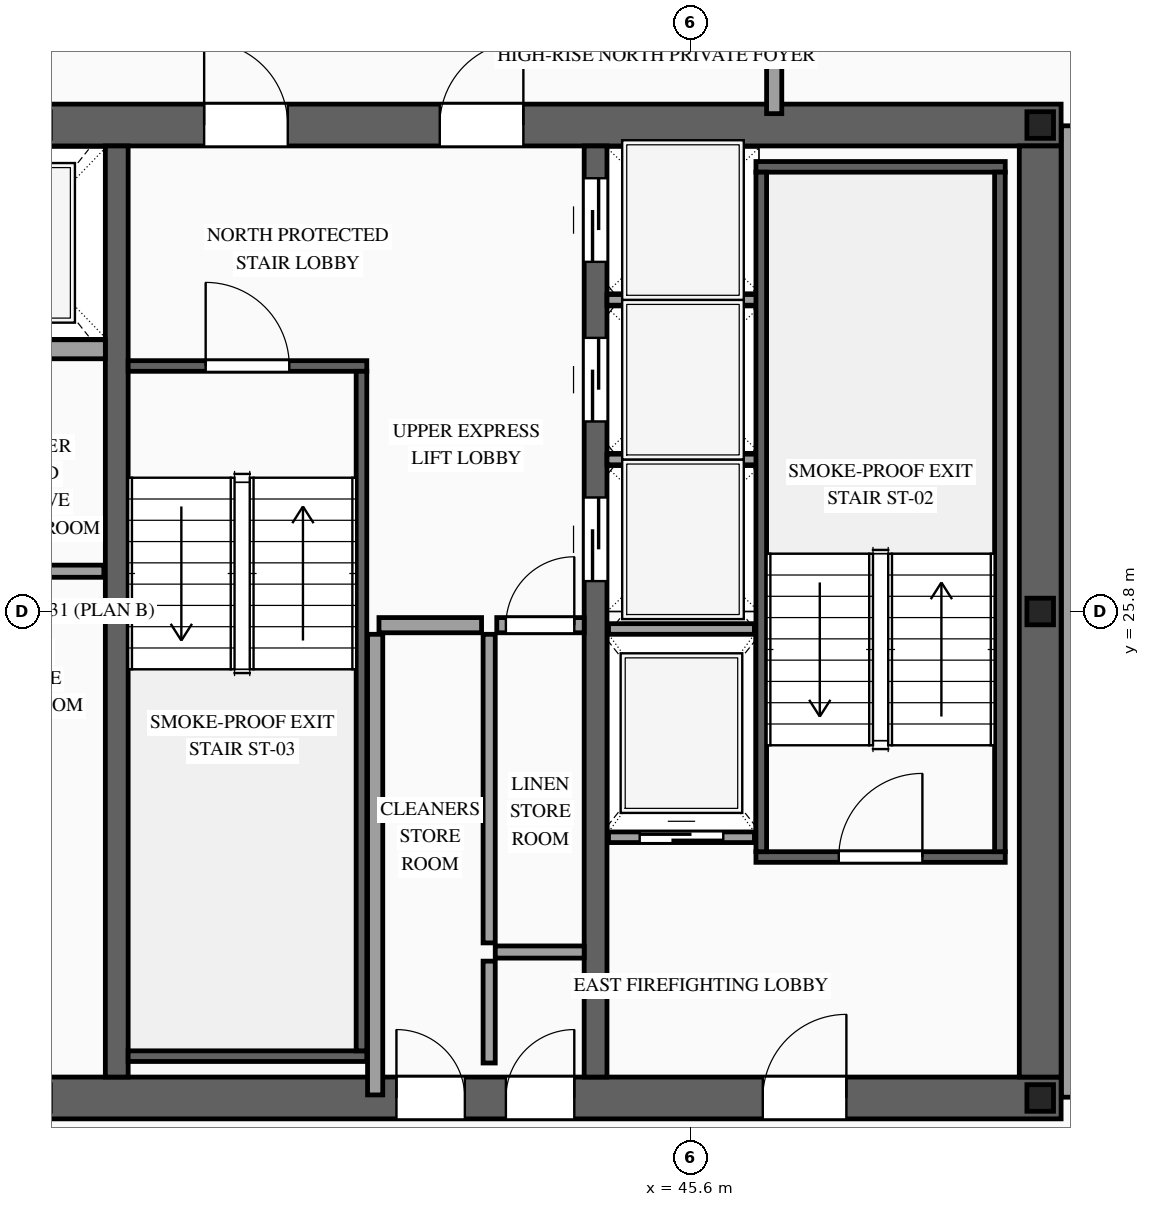
"""IFC4 building model, lengths in metres.
Left out: names, types, materials, properties, quantities, classifications, styles, units other than length and angle.
Written with IfcOpenShell. Run it as: python <this file> out.ifc"""

import sys

from ifc_helpers import new_model, si_unit, direction, frame, frame_2d, origin, origin_2d, place, context, subcontext, project, spatial, rectangle, i_section, extrude, source, transform, mapped, element, fill, save


model = new_model("IFC4")
c1 = context("Model", 3, precision=1e-05, world=origin(), true_north=direction((0.0, 1.0)))
c2 = subcontext(c1, "Body", "Model", "MODEL_VIEW")
j1 = project(units=[si_unit("LENGTHUNIT", "METRE"), si_unit("PLANEANGLEUNIT", "RADIAN")], contexts=[c1])
p1 = place(None, origin())
s1 = spatial("IfcSite", under=j1, at=p1, CompositionType="ELEMENT")
p2 = place(p1, origin())
s2 = spatial("IfcBuilding", under=s1, at=p2, CompositionType="ELEMENT")
p3 = place(p2, frame((0.0, 0.0, 271.6)))
s3 = spatial("IfcBuildingStorey", under=s2, at=p3, CompositionType="ELEMENT", Elevation=271.6)
p4 = place(p3, frame((23.525, 19.4, 0.0), z_axis=(0.0, 0.0, 1.0), x_axis=(1.0, 0.0, 0.0)))
e1 = element("IfcWall", 1, at=p4, inside=s3, PredefinedType="SHEAR", context=c2, shape_type="SweptSolid", body=[
    extrude(rectangle(XDim=26.95, YDim=0.55, at=frame_2d((13.475, 0.0))), origin(), (0.0, 0.0, 1.0), 3.5),
])
p5 = place(p4, frame((1.925, 0.0, 0.0)))
e2 = element("IfcOpeningElement", 2, at=p5, cuts=e1, PredefinedType="OPENING", context=c2, shape_type="SweptSolid", body=[
    extrude(rectangle(XDim=1.1, YDim=2.2, at=frame_2d((0.55, 1.1))), frame((0.0, 0.29, 0.0), z_axis=(0.0, -1.0, 0.0), x_axis=(1.0, 0.0, 0.0)), (0.0, 0.0, 1.0), 0.58),
])
p6 = place(p4, frame((9.825, 0.0, 0.0)))
e3 = element("IfcOpeningElement", 3, at=p6, cuts=e1, PredefinedType="OPENING", context=c2, shape_type="SweptSolid", body=[
    extrude(rectangle(XDim=1.1, YDim=2.2, at=frame_2d((0.55, 1.1))), frame((0.0, 0.29, 0.0), z_axis=(0.0, -1.0, 0.0), x_axis=(1.0, 0.0, 0.0)), (0.0, 0.0, 1.0), 0.58),
])
p7 = place(p4, frame((23.025, 0.0, 0.0)))
e4 = element("IfcOpeningElement", 4, at=p7, cuts=e1, PredefinedType="OPENING", context=c2, shape_type="SweptSolid", body=[
    extrude(rectangle(XDim=1.1, YDim=2.2, at=frame_2d((0.55, 1.1))), frame((0.0, 0.29, 0.0), z_axis=(0.0, -1.0, 0.0), x_axis=(1.0, 0.0, 0.0)), (0.0, 0.0, 1.0), 0.58),
])
p8 = place(p4, frame((19.645, 0.0, 0.0)))
e5 = element("IfcOpeningElement", 5, at=p8, cuts=e1, PredefinedType="OPENING", context=c2, shape_type="SweptSolid", body=[
    extrude(rectangle(XDim=0.9, YDim=2.15, at=frame_2d((0.45, 1.075))), frame((0.0, 0.29, 0.0), z_axis=(0.0, -1.0, 0.0), x_axis=(1.0, 0.0, 0.0)), (0.0, 0.0, 1.0), 0.58),
])
p9 = place(p4, frame((18.205, 0.0, 0.0)))
e6 = element("IfcOpeningElement", 6, at=p9, cuts=e1, PredefinedType="OPENING", context=c2, shape_type="SweptSolid", body=[
    extrude(rectangle(XDim=0.9, YDim=2.15, at=frame_2d((0.45, 1.075))), frame((0.0, 0.29, 0.0), z_axis=(0.0, -1.0, 0.0), x_axis=(1.0, 0.0, 0.0)), (0.0, 0.0, 1.0), 0.58),
])
p10 = place(p3, frame((23.525, 32.2, 0.0), z_axis=(0.0, 0.0, 1.0), x_axis=(1.0, 0.0, 0.0)))
e7 = element("IfcWall", 7, at=p10, inside=s3, PredefinedType="SHEAR", context=c2, shape_type="SweptSolid", body=[
    extrude(rectangle(XDim=26.95, YDim=0.55, at=frame_2d((13.475, 0.0))), origin(), (0.0, 0.0, 1.0), 3.5),
])
p11 = place(p10, frame((4.545, 0.0, 0.0)))
e8 = element("IfcOpeningElement", 8, at=p11, cuts=e7, PredefinedType="OPENING", context=c2, shape_type="SweptSolid", body=[
    extrude(rectangle(XDim=0.9, YDim=2.15, at=frame_2d((0.45, 1.075))), frame((0.0, 0.29, 0.0), z_axis=(0.0, -1.0, 0.0), x_axis=(1.0, 0.0, 0.0)), (0.0, 0.0, 1.0), 0.58),
])
p12 = place(p10, frame((9.825, 0.0, 0.0)))
e9 = element("IfcOpeningElement", 9, at=p12, cuts=e7, PredefinedType="OPENING", context=c2, shape_type="SweptSolid", body=[
    extrude(rectangle(XDim=1.1, YDim=2.2, at=frame_2d((0.55, 1.1))), frame((0.0, 0.29, 0.0), z_axis=(0.0, -1.0, 0.0), x_axis=(1.0, 0.0, 0.0)), (0.0, 0.0, 1.0), 0.58),
])
p13 = place(p10, frame((15.675, 0.0, 0.0)))
e10 = element("IfcOpeningElement", 10, at=p13, cuts=e7, PredefinedType="OPENING", context=c2, shape_type="SweptSolid", body=[
    extrude(rectangle(XDim=1.1, YDim=2.2, at=frame_2d((0.55, 1.1))), frame((0.0, 0.29, 0.0), z_axis=(0.0, -1.0, 0.0), x_axis=(1.0, 0.0, 0.0)), (0.0, 0.0, 1.0), 0.58),
])
p14 = place(p10, frame((18.775, 0.0, 0.0)))
e11 = element("IfcOpeningElement", 11, at=p14, cuts=e7, PredefinedType="OPENING", context=c2, shape_type="SweptSolid", body=[
    extrude(rectangle(XDim=1.1, YDim=2.2, at=frame_2d((0.55, 1.1))), frame((0.0, 0.29, 0.0), z_axis=(0.0, -1.0, 0.0), x_axis=(1.0, 0.0, 0.0)), (0.0, 0.0, 1.0), 0.58),
])
m1 = source(origin(), c2, "Body", "SweptSolid", [
    extrude(rectangle(XDim=12.25, YDim=0.55, at=frame_2d((6.125, 0.0))), origin(), (0.0, 0.0, 1.0), 3.5),
])
p15 = place(p3, frame((50.2, 19.675, 0.0), z_axis=(0.0, 0.0, 1.0), x_axis=(0.0, 1.0, 0.0)))
e12 = element("IfcWall", 12, at=p15, inside=s3, PredefinedType="SHEAR", context=c2, shape_type="MappedRepresentation", body=[
    mapped(m1, transform((0.0, 0.0, 0.0), scale=1.0)),
])
m2 = source(origin(), c2, "Body", "SweptSolid", [
    extrude(rectangle(XDim=12.25, YDim=0.3, at=frame_2d((6.125, 0.0))), origin(), (0.0, 0.0, 1.0), 3.5),
])
p16 = place(p3, frame((38.05, 19.675, 0.0), z_axis=(0.0, 0.0, 1.0), x_axis=(0.0, 1.0, 0.0)))
e13 = element("IfcWall", 13, at=p16, inside=s3, PredefinedType="SOLIDWALL", context=c2, shape_type="MappedRepresentation", body=[
    mapped(m2, transform((0.0, 0.0, 0.0), scale=1.0)),
])
p17 = place(p3, frame((44.35, 19.675, 0.0), z_axis=(0.0, 0.0, 1.0), x_axis=(0.0, 1.0, 0.0)))
e14 = element("IfcWall", 14, at=p17, inside=s3, PredefinedType="SOLIDWALL", context=c2, shape_type="SweptSolid", body=[
    extrude(rectangle(XDim=12.25, YDim=0.3, at=frame_2d((6.125, 0.0))), origin(), (0.0, 0.0, 1.0), 3.5),
])
p18 = place(p17, frame((6.525, 0.0, 0.0)))
e15 = element("IfcOpeningElement", 15, at=p18, cuts=e14, PredefinedType="OPENING", context=c2, shape_type="SweptSolid", body=[
    extrude(rectangle(XDim=1.1, YDim=2.2, at=frame_2d((0.55, 1.1))), frame((0.0, 0.165, 0.0), z_axis=(0.0, -1.0, 0.0), x_axis=(1.0, 0.0, 0.0)), (0.0, 0.0, 1.0), 0.33),
])
p19 = place(p17, frame((8.625, 0.0, 0.0)))
e16 = element("IfcOpeningElement", 16, at=p19, cuts=e14, PredefinedType="OPENING", context=c2, shape_type="SweptSolid", body=[
    extrude(rectangle(XDim=1.1, YDim=2.2, at=frame_2d((0.55, 1.1))), frame((0.0, 0.165, 0.0), z_axis=(0.0, -1.0, 0.0), x_axis=(1.0, 0.0, 0.0)), (0.0, 0.0, 1.0), 0.33),
])
p20 = place(p17, frame((10.725, 0.0, 0.0)))
e17 = element("IfcOpeningElement", 17, at=p20, cuts=e14, PredefinedType="OPENING", context=c2, shape_type="SweptSolid", body=[
    extrude(rectangle(XDim=1.1, YDim=2.2, at=frame_2d((0.55, 1.1))), frame((0.0, 0.165, 0.0), z_axis=(0.0, -1.0, 0.0), x_axis=(1.0, 0.0, 0.0)), (0.0, 0.0, 1.0), 0.33),
])
m3 = source(origin(), c2, "Body", "SweptSolid", [
    extrude(i_section(OverallWidth=0.35, OverallDepth=0.35, WebThickness=0.012, FlangeThickness=0.019, at=origin_2d()), origin(), (0.0, 0.0, 1.0), 3.5),
])
for number, where, z_axis, x_axis in (
    (18, (50.2, 19.4, 0.0), (0.0, 0.0, 1.0), (1.0, 0.0, 0.0)),
    (19, (50.2, 25.8, 0.0), (0.0, 0.0, 1.0), (1.0, 0.0, 0.0)),
    (20, (50.2, 32.2, 0.0), (0.0, 0.0, 1.0), (1.0, 0.0, 0.0)),
):
    element("IfcColumn", number, at=place(p3, frame(where, z_axis=z_axis, x_axis=x_axis)), inside=s3, PredefinedType="COLUMN", context=c2, shape_type="MappedRepresentation", body=[
        mapped(m3, transform((0.0, 0.0, 0.0), scale=1.0)),
    ])
p21 = place(p3, frame((44.52, 22.83, 0.0), z_axis=(0.0, 0.0, 1.0), x_axis=(1.0, 0.0, 0.0)))
e21 = element("IfcWall", 21, at=p21, inside=s3, PredefinedType="SOLIDWALL", context=c2, shape_type="SweptSolid", body=[
    extrude(rectangle(XDim=1.92, YDim=0.14, at=frame_2d((0.96, 0.0))), origin(), (0.0, 0.0, 1.0), 3.28),
])
p22 = place(p21, frame((0.41, 0.0, 0.0)))
e22 = element("IfcOpeningElement", 22, at=p22, cuts=e21, PredefinedType="OPENING", context=c2, shape_type="SweptSolid", body=[
    extrude(rectangle(XDim=1.1, YDim=2.2, at=frame_2d((0.55, 1.1))), frame((0.0, 0.085, 0.0), z_axis=(0.0, -1.0, 0.0), x_axis=(1.0, 0.0, 0.0)), (0.0, 0.0, 1.0), 0.17),
])
m4 = source(origin(), c2, "Body", "SweptSolid", [
    extrude(rectangle(XDim=1.92, YDim=0.14, at=frame_2d((0.96, 0.0))), origin(), (0.0, 0.0, 1.0), 3.28),
])
p23 = place(p3, frame((44.52, 25.57, 0.0), z_axis=(0.0, 0.0, 1.0), x_axis=(1.0, 0.0, 0.0)))
e23 = element("IfcWall", 23, at=p23, inside=s3, PredefinedType="SOLIDWALL", context=c2, shape_type="MappedRepresentation", body=[
    mapped(m4, transform((0.0, 0.0, 0.0), scale=1.0)),
])
m5 = source(origin(), c2, "Body", "SweptSolid", [
    extrude(rectangle(XDim=2.4, YDim=0.25, at=frame_2d((1.2, 0.0))), origin(), (0.0, 0.0, 1.0), 3.28),
])
p24 = place(p3, frame((35.5, 29.25, 0.0), z_axis=(0.0, 0.0, 1.0), x_axis=(1.0, 0.0, 0.0)))
e24 = element("IfcWall", 24, at=p24, inside=s3, PredefinedType="SOLIDWALL", context=c2, shape_type="MappedRepresentation", body=[
    mapped(m5, transform((0.0, 0.0, 0.0), scale=1.0)),
])
m6 = source(origin(), c2, "Body", "SweptSolid", [
    extrude(rectangle(XDim=2.0, YDim=0.14, at=frame_2d((1.0, 0.0))), origin(), (0.0, 0.0, 1.0), 3.28),
])
for number, where, z_axis, x_axis in (
    (25, (44.5, 27.8, 0.0), (0.0, 0.0, 1.0), (1.0, 0.0, 0.0)),
    (26, (44.5, 29.9, 0.0), (0.0, 0.0, 1.0), (1.0, 0.0, 0.0)),
):
    element("IfcWall", number, at=place(p3, frame(where, z_axis=z_axis, x_axis=x_axis)), inside=s3, PredefinedType="SOLIDWALL", context=c2, shape_type="MappedRepresentation", body=[
        mapped(m6, transform((0.0, 0.0, 0.0), scale=1.0)),
    ])
p25 = place(p3, frame((46.46, 22.57, 0.0), z_axis=(0.0, 0.0, 1.0), x_axis=(1.0, 0.0, 0.0)))
e27 = element("IfcWall", 27, at=p25, inside=s3, PredefinedType="SOLIDWALL", context=c2, shape_type="SweptSolid", body=[
    extrude(rectangle(XDim=3.28, YDim=0.14, at=frame_2d((1.64, 0.0))), origin(), (0.0, 0.0, 1.0), 3.28),
])
p26 = place(p25, frame((1.09, 0.0, 0.0)))
e28 = element("IfcOpeningElement", 28, at=p26, cuts=e27, PredefinedType="OPENING", context=c2, shape_type="SweptSolid", body=[
    extrude(rectangle(XDim=1.1, YDim=2.2, at=frame_2d((0.55, 1.1))), frame((0.0, 0.085, 0.0), z_axis=(0.0, -1.0, 0.0), x_axis=(1.0, 0.0, 0.0)), (0.0, 0.0, 1.0), 0.17),
])
m7 = source(origin(), c2, "Body", "SweptSolid", [
    extrude(rectangle(XDim=3.28, YDim=0.14, at=frame_2d((1.64, 0.0))), origin(), (0.0, 0.0, 1.0), 3.28),
])
p27 = place(p3, frame((46.46, 31.65, 0.0), z_axis=(0.0, 0.0, 1.0), x_axis=(1.0, 0.0, 0.0)))
e29 = element("IfcWall", 29, at=p27, inside=s3, PredefinedType="SOLIDWALL", context=c2, shape_type="MappedRepresentation", body=[
    mapped(m7, transform((0.0, 0.0, 0.0), scale=1.0)),
])
m8 = source(origin(), c2, "Body", "SweptSolid", [
    extrude(rectangle(XDim=8.94, YDim=0.14, at=frame_2d((4.47, 0.0))), origin(), (0.0, 0.0, 1.0), 3.28),
])
for number, where, z_axis, x_axis in (
    (30, (46.53, 22.64, 0.0), (0.0, 0.0, 1.0), (0.0, 1.0, 0.0)),
    (31, (49.67, 22.64, 0.0), (0.0, 0.0, 1.0), (0.0, 1.0, 0.0)),
):
    element("IfcWall", number, at=place(p3, frame(where, z_axis=z_axis, x_axis=x_axis)), inside=s3, PredefinedType="SOLIDWALL", context=c2, shape_type="MappedRepresentation", body=[
        mapped(m8, transform((0.0, 0.0, 0.0), scale=1.0)),
    ])
p28 = place(p3, frame((38.2, 29.03, 0.0), z_axis=(0.0, 0.0, 1.0), x_axis=(1.0, 0.0, 0.0)))
e32 = element("IfcWall", 32, at=p28, inside=s3, PredefinedType="SOLIDWALL", context=c2, shape_type="SweptSolid", body=[
    extrude(rectangle(XDim=3.14, YDim=0.14, at=frame_2d((1.57, 0.0))), origin(), (0.0, 0.0, 1.0), 3.28),
])
p29 = place(p28, frame((1.02, 0.0, 0.0)))
e33 = element("IfcOpeningElement", 33, at=p29, cuts=e32, PredefinedType="OPENING", context=c2, shape_type="SweptSolid", body=[
    extrude(rectangle(XDim=1.1, YDim=2.2, at=frame_2d((0.55, 1.1))), frame((0.0, 0.085, 0.0), z_axis=(0.0, -1.0, 0.0), x_axis=(1.0, 0.0, 0.0)), (0.0, 0.0, 1.0), 0.17),
])
m9 = source(origin(), c2, "Body", "SweptSolid", [
    extrude(rectangle(XDim=3.14, YDim=0.14, at=frame_2d((1.57, 0.0))), origin(), (0.0, 0.0, 1.0), 3.28),
])
p30 = place(p3, frame((38.2, 19.95, 0.0), z_axis=(0.0, 0.0, 1.0), x_axis=(1.0, 0.0, 0.0)))
e34 = element("IfcWall", 34, at=p30, inside=s3, PredefinedType="SOLIDWALL", context=c2, shape_type="MappedRepresentation", body=[
    mapped(m9, transform((0.0, 0.0, 0.0), scale=1.0)),
])
m10 = source(origin(), c2, "Body", "SweptSolid", [
    extrude(rectangle(XDim=8.94, YDim=0.14, at=frame_2d((4.47, 0.0))), origin(), (0.0, 0.0, 1.0), 3.28),
])
p31 = place(p3, frame((41.27, 20.02, 0.0), z_axis=(0.0, 0.0, 1.0), x_axis=(0.0, 1.0, 0.0)))
e35 = element("IfcWall", 35, at=p31, inside=s3, PredefinedType="SOLIDWALL", context=c2, shape_type="MappedRepresentation", body=[
    mapped(m10, transform((0.0, 0.0, 0.0), scale=1.0)),
])
m11 = source(origin(), c2, "Body", "SweptSolid", [
    extrude(rectangle(XDim=2.36, YDim=0.16, at=frame_2d((1.18, 0.0))), origin(), (0.0, 0.0, 1.0), 3.28),
])
p32 = place(p3, frame((35.52, 26.33, 0.0), z_axis=(0.0, 0.0, 1.0), x_axis=(1.0, 0.0, 0.0)))
e36 = element("IfcWall", 36, at=p32, inside=s3, PredefinedType="PARTITIONING", context=c2, shape_type="MappedRepresentation", body=[
    mapped(m11, transform((0.0, 0.0, 0.0), scale=1.0)),
])
m12 = source(origin(), c2, "Body", "SweptSolid", [
    extrude(rectangle(XDim=1.34, YDim=0.16, at=frame_2d((0.67, 0.0))), origin(), (0.0, 0.0, 1.0), 3.28),
])
p33 = place(p3, frame((42.95, 19.86, 0.0), z_axis=(0.0, 0.0, 1.0), x_axis=(0.0, 1.0, 0.0)))
e37 = element("IfcWall", 37, at=p33, inside=s3, PredefinedType="PARTITIONING", context=c2, shape_type="MappedRepresentation", body=[
    mapped(m12, transform((0.0, 0.0, 0.0), scale=1.0)),
])
m13 = source(origin(), c2, "Body", "SweptSolid", [
    extrude(rectangle(XDim=1.17, YDim=0.16, at=frame_2d((0.585, 0.0))), origin(), (0.0, 0.0, 1.0), 3.28),
])
p34 = place(p3, frame((43.03, 21.32, 0.0), z_axis=(0.0, 0.0, 1.0), x_axis=(1.0, 0.0, 0.0)))
e38 = element("IfcWall", 38, at=p34, inside=s3, PredefinedType="PARTITIONING", context=c2, shape_type="MappedRepresentation", body=[
    mapped(m13, transform((0.0, 0.0, 0.0), scale=1.0)),
])
m14 = source(origin(), c2, "Body", "SweptSolid", [
    extrude(rectangle(XDim=6.06, YDim=0.2, at=frame_2d((3.03, 0.0))), origin(), (0.0, 0.0, 1.0), 3.28),
])
p35 = place(p3, frame((41.45, 19.44, 0.0), z_axis=(0.0, 0.0, 1.0), x_axis=(0.0, 1.0, 0.0)))
e39 = element("IfcWall", 39, at=p35, inside=s3, PredefinedType="PARTITIONING", context=c2, shape_type="MappedRepresentation", body=[
    mapped(m14, transform((0.0, 0.0, 0.0), scale=1.0)),
])
m15 = source(origin(), c2, "Body", "SweptSolid", [
    extrude(rectangle(XDim=1.35, YDim=0.2, at=frame_2d((0.675, 0.0))), origin(), (0.0, 0.0, 1.0), 3.28),
])
p36 = place(p3, frame((41.5, 25.62, 0.0), z_axis=(0.0, 0.0, 1.0), x_axis=(1.0, 0.0, 0.0)))
e40 = element("IfcWall", 40, at=p36, inside=s3, PredefinedType="PARTITIONING", context=c2, shape_type="MappedRepresentation", body=[
    mapped(m15, transform((0.0, 0.0, 0.0), scale=1.0)),
])
m16 = source(origin(), c2, "Body", "SweptSolid", [
    extrude(rectangle(XDim=4.06, YDim=0.16, at=frame_2d((2.03, 0.0))), origin(), (0.0, 0.0, 1.0), 3.28),
])
p37 = place(p3, frame((42.95, 21.44, 0.0), z_axis=(0.0, 0.0, 1.0), x_axis=(0.0, 1.0, 0.0)))
e41 = element("IfcWall", 41, at=p37, inside=s3, PredefinedType="PARTITIONING", context=c2, shape_type="MappedRepresentation", body=[
    mapped(m16, transform((0.0, 0.0, 0.0), scale=1.0)),
])
p38 = place(p3, frame((43.05, 25.62, 0.0), z_axis=(0.0, 0.0, 1.0), x_axis=(1.0, 0.0, 0.0)))
e42 = element("IfcWall", 42, at=p38, inside=s3, PredefinedType="PARTITIONING", context=c2, shape_type="SweptSolid", body=[
    extrude(rectangle(XDim=1.15, YDim=0.2, at=frame_2d((0.575, 0.0))), origin(), (0.0, 0.0, 1.0), 3.28),
])
p39 = place(p38, frame((0.12, 0.0, 0.0)))
e43 = element("IfcOpeningElement", 43, at=p39, cuts=e42, PredefinedType="OPENING", context=c2, shape_type="SweptSolid", body=[
    extrude(rectangle(XDim=0.9, YDim=2.15, at=frame_2d((0.45, 1.075))), frame((0.0, 0.115, 0.0), z_axis=(0.0, -1.0, 0.0), x_axis=(1.0, 0.0, 0.0)), (0.0, 0.0, 1.0), 0.23),
])
m17 = source(origin(), c2, "Body", "SweptSolid", [
    extrude(rectangle(XDim=1.7, YDim=0.2, at=frame_2d((0.85, 0.0))), origin(), (0.0, 0.0, 1.0), 3.28),
])
p40 = place(p3, frame((46.7, 32.35, 0.0), z_axis=(0.0, 0.0, 1.0), x_axis=(0.0, 1.0, 0.0)))
e44 = element("IfcWall", 44, at=p40, inside=s3, PredefinedType="PARTITIONING", context=c2, shape_type="MappedRepresentation", body=[
    mapped(m17, transform((0.0, 0.0, 0.0), scale=1.0)),
])
m18 = source(origin(), c2, "Body", "SweptSolid", [
    extrude(rectangle(XDim=12.78, YDim=0.2, at=frame_2d((6.39, 0.0))), origin(), (0.0, 0.0, 1.0), 3.28),
])
p41 = place(p3, frame((50.58, 19.41, 0.0), z_axis=(0.0, 0.0, 1.0), x_axis=(0.0, 1.0, 0.0)))
e45 = element("IfcWall", 45, at=p41, inside=s3, PredefinedType="PARTITIONING", context=c2, shape_type="MappedRepresentation", body=[
    mapped(m18, transform((0.0, 0.0, 0.0), scale=1.0)),
])
m19 = source(origin(), c2, "Body", "SweptSolid", [
    extrude(rectangle(XDim=1.1, YDim=2.2, at=frame_2d((0.55, 1.1))), frame((0.0, 0.025, 0.0), z_axis=(0.0, -1.0, 0.0), x_axis=(1.0, 0.0, 0.0)), (0.0, 0.0, 1.0), 0.05),
])
p42 = place(p22, origin())
e46 = element("IfcDoor", 46, at=p42, inside=s3, OperationType="SLIDING_TO_RIGHT", PredefinedType="DOOR", context=c2, shape_type="MappedRepresentation", body=[
    mapped(m19, transform((0.0, 0.0, 0.0), scale=1.0)),
])
fill(e22, e46)
p43 = place(p18, origin())
e47 = element("IfcDoor", 47, at=p43, inside=s3, OperationType="SLIDING_TO_LEFT", PredefinedType="DOOR", context=c2, shape_type="MappedRepresentation", body=[
    mapped(m19, transform((0.0, 0.0, 0.0), scale=1.0)),
])
fill(e15, e47)
p44 = place(p19, origin())
e48 = element("IfcDoor", 48, at=p44, inside=s3, OperationType="SLIDING_TO_RIGHT", PredefinedType="DOOR", context=c2, shape_type="MappedRepresentation", body=[
    mapped(m19, transform((0.0, 0.0, 0.0), scale=1.0)),
])
fill(e16, e48)
p45 = place(p20, origin())
e49 = element("IfcDoor", 49, at=p45, inside=s3, OperationType="SLIDING_TO_LEFT", PredefinedType="DOOR", context=c2, shape_type="MappedRepresentation", body=[
    mapped(m19, transform((0.0, 0.0, 0.0), scale=1.0)),
])
fill(e17, e49)
m20 = source(origin(), c2, "Body", "SweptSolid", [
    extrude(rectangle(XDim=1.1, YDim=2.2, at=frame_2d((0.55, 1.1))), frame((0.0, 0.025, 0.0), z_axis=(0.0, -1.0, 0.0), x_axis=(1.0, 0.0, 0.0)), (0.0, 0.0, 1.0), 0.05),
])
p46 = place(p26, origin())
e50 = element("IfcDoor", 50, at=p46, inside=s3, OperationType="SINGLE_SWING_RIGHT", PredefinedType="DOOR", context=c2, shape_type="MappedRepresentation", body=[
    mapped(m20, transform((0.0, 0.0, 0.0), scale=1.0)),
])
fill(e28, e50)
p47 = place(p29, origin())
e51 = element("IfcDoor", 51, at=p47, inside=s3, OperationType="SINGLE_SWING_LEFT", PredefinedType="DOOR", context=c2, shape_type="MappedRepresentation", body=[
    mapped(m20, transform((0.0, 0.0, 0.0), scale=1.0)),
])
fill(e33, e51)
p48 = place(p7, origin())
e52 = element("IfcDoor", 52, at=p48, inside=s3, OperationType="SINGLE_SWING_RIGHT", PredefinedType="DOOR", context=c2, shape_type="MappedRepresentation", body=[
    mapped(m20, transform((0.0, 0.0, 0.0), scale=1.0)),
])
fill(e4, e52)
p49 = place(p13, origin())
e53 = element("IfcDoor", 53, at=p49, inside=s3, OperationType="SINGLE_SWING_LEFT", PredefinedType="DOOR", context=c2, shape_type="MappedRepresentation", body=[
    mapped(m20, transform((0.0, 0.0, 0.0), scale=1.0)),
])
fill(e10, e53)
p50 = place(p14, origin())
e54 = element("IfcDoor", 54, at=p50, inside=s3, OperationType="SINGLE_SWING_RIGHT", PredefinedType="DOOR", context=c2, shape_type="MappedRepresentation", body=[
    mapped(m20, transform((0.0, 0.0, 0.0), scale=1.0)),
])
fill(e11, e54)
m21 = source(origin(), c2, "Body", "SweptSolid", [
    extrude(rectangle(XDim=0.9, YDim=2.15, at=frame_2d((0.45, 1.075))), frame((0.0, 0.025, 0.0), z_axis=(0.0, -1.0, 0.0), x_axis=(1.0, 0.0, 0.0)), (0.0, 0.0, 1.0), 0.05),
])
p51 = place(p8, origin())
e55 = element("IfcDoor", 55, at=p51, inside=s3, OperationType="SINGLE_SWING_RIGHT", PredefinedType="DOOR", context=c2, shape_type="MappedRepresentation", body=[
    mapped(m21, transform((0.0, 0.0, 0.0), scale=1.0)),
])
fill(e5, e55)
p52 = place(p9, origin())
e56 = element("IfcDoor", 56, at=p52, inside=s3, OperationType="SINGLE_SWING_LEFT", PredefinedType="DOOR", context=c2, shape_type="MappedRepresentation", body=[
    mapped(m21, transform((0.0, 0.0, 0.0), scale=1.0)),
])
fill(e6, e56)
p53 = place(p39, origin())
e57 = element("IfcDoor", 57, at=p53, inside=s3, OperationType="SINGLE_SWING_RIGHT", PredefinedType="DOOR", context=c2, shape_type="MappedRepresentation", body=[
    mapped(m21, transform((0.0, 0.0, 0.0), scale=1.0)),
])
fill(e43, e57)
save(model, sys.argv[1])
